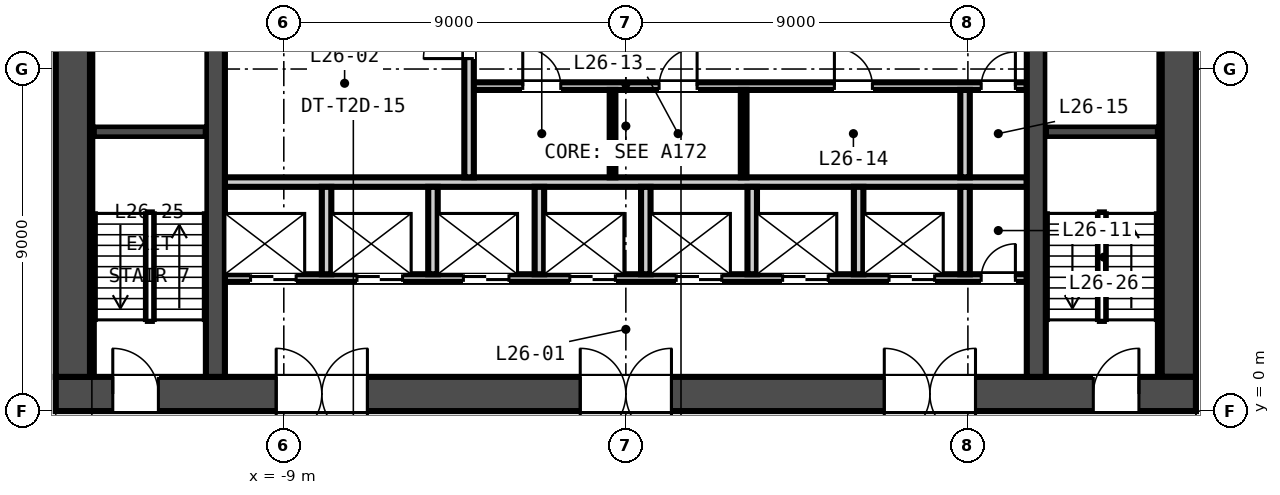
"""IFC4 building model, lengths in metres.
Left out: names, types, materials, properties, quantities, classifications, styles, units other than length and angle.
Written with IfcOpenShell. Run it as: python <this file> out.ifc"""

import sys

from ifc_helpers import new_model, si_unit, direction, frame, frame_2d, origin, place, context, subcontext, project, spatial, rectangle, extrude, element, fill, save


model = new_model("IFC4")
c1 = context("Model", 3, precision=1e-05, world=origin(), true_north=direction((0.0, 1.0)))
c2 = subcontext(c1, "Body", "Model", "MODEL_VIEW")
j1 = project(units=[si_unit("LENGTHUNIT", "METRE"), si_unit("PLANEANGLEUNIT", "RADIAN")], contexts=[c1])
p1 = place(None, origin())
s1 = spatial("IfcSite", under=j1, at=p1, CompositionType="ELEMENT")
p2 = place(p1, origin())
s2 = spatial("IfcBuilding", under=s1, at=p2, CompositionType="ELEMENT")
p3 = place(p2, frame((0.0, 0.0, 109.85)))
s3 = spatial("IfcBuildingStorey", under=s2, at=p3, CompositionType="ELEMENT", Elevation=109.85)
p4 = place(p3, frame((-15.0, 0.45, -0.15), z_axis=(0.0, 0.0, 1.0), x_axis=(1.0, 0.0, 0.0)))
e1 = element("IfcWall", 1, at=p4, inside=s3, PredefinedType="SOLIDWALL", context=c2, shape_type="SweptSolid", body=[
    extrude(rectangle(XDim=30.0, YDim=0.9, at=frame_2d((15.0, 0.0))), origin(), (0.0, 0.0, 1.0), 3.65),
])
p5 = place(p4, frame((5.8, 0.0, 0.15)))
e2 = element("IfcOpeningElement", 2, at=p5, cuts=e1, PredefinedType="OPENING", context=c2, shape_type="SweptSolid", body=[
    extrude(rectangle(XDim=2.4, YDim=2.4, at=frame_2d((1.2, 1.2))), frame((0.0, 0.46, 0.0), z_axis=(0.0, -1.0, 0.0), x_axis=(1.0, 0.0, 0.0)), (0.0, 0.0, 1.0), 0.92),
])
p6 = place(p4, frame((13.8, 0.0, 0.15)))
e3 = element("IfcOpeningElement", 3, at=p6, cuts=e1, PredefinedType="OPENING", context=c2, shape_type="SweptSolid", body=[
    extrude(rectangle(XDim=2.4, YDim=2.4, at=frame_2d((1.2, 1.2))), frame((0.0, 0.46, 0.0), z_axis=(0.0, -1.0, 0.0), x_axis=(1.0, 0.0, 0.0)), (0.0, 0.0, 1.0), 0.92),
])
p7 = place(p4, frame((21.8, 0.0, 0.15)))
e4 = element("IfcOpeningElement", 4, at=p7, cuts=e1, PredefinedType="OPENING", context=c2, shape_type="SweptSolid", body=[
    extrude(rectangle(XDim=2.4, YDim=2.4, at=frame_2d((1.2, 1.2))), frame((0.0, 0.46, 0.0), z_axis=(0.0, -1.0, 0.0), x_axis=(1.0, 0.0, 0.0)), (0.0, 0.0, 1.0), 0.92),
])
p8 = place(p4, frame((1.5, 0.0, 0.15)))
e5 = element("IfcOpeningElement", 5, at=p8, cuts=e1, PredefinedType="OPENING", context=c2, shape_type="SweptSolid", body=[
    extrude(rectangle(XDim=1.2, YDim=2.1, at=frame_2d((0.6, 1.05))), frame((0.0, 0.46, 0.0), z_axis=(0.0, -1.0, 0.0), x_axis=(1.0, 0.0, 0.0)), (0.0, 0.0, 1.0), 0.92),
])
p9 = place(p4, frame((27.3, 0.0, 0.15)))
e6 = element("IfcOpeningElement", 6, at=p9, cuts=e1, PredefinedType="OPENING", context=c2, shape_type="SweptSolid", body=[
    extrude(rectangle(XDim=1.2, YDim=2.1, at=frame_2d((0.6, 1.05))), frame((0.0, 0.46, 0.0), z_axis=(0.0, -1.0, 0.0), x_axis=(1.0, 0.0, 0.0)), (0.0, 0.0, 1.0), 0.92),
])
for number, where, z_axis, x_axis in (
    (7, (-14.55, 0.9, -0.15), (0.0, 0.0, 1.0), (0.0, 1.0, 0.0)),
    (8, (14.55, 0.9, -0.15), (0.0, 0.0, 1.0), (0.0, 1.0, 0.0)),
):
    element("IfcWall", number, at=place(p3, frame(where, z_axis=z_axis, x_axis=x_axis)), inside=s3, PredefinedType="SOLIDWALL", context=c2, shape_type="SweptSolid", body=[
        extrude(rectangle(XDim=13.2, YDim=0.9, at=frame_2d((6.6, 0.0))), origin(), (0.0, 0.0, 1.0), 3.65),
    ])
for number, where, z_axis, x_axis in (
    (9, (-10.8, 0.9, -0.15), (0.0, 0.0, 1.0), (0.0, 1.0, 0.0)),
    (10, (10.8, 0.9, -0.15), (0.0, 0.0, 1.0), (0.0, 1.0, 0.0)),
):
    element("IfcWall", number, at=place(p3, frame(where, z_axis=z_axis, x_axis=x_axis)), inside=s3, PredefinedType="SOLIDWALL", context=c2, shape_type="SweptSolid", body=[
        extrude(rectangle(XDim=13.2, YDim=0.5, at=frame_2d((6.6, 0.0))), origin(), (0.0, 0.0, 1.0), 3.65),
    ])
p10 = place(p3, frame((-10.55, 3.5, 0.0), z_axis=(0.0, 0.0, 1.0), x_axis=(1.0, 0.0, 0.0)))
e11 = element("IfcWall", 11, at=p10, inside=s3, PredefinedType="PARTITIONING", context=c2, shape_type="SweptSolid", body=[
    extrude(rectangle(XDim=21.1, YDim=0.2, at=frame_2d((10.55, 0.0))), origin(), (0.0, 0.0, 1.0), 3.5),
])
p11 = place(p10, frame((0.675, 0.0, 0.0)))
e12 = element("IfcOpeningElement", 12, at=p11, cuts=e11, PredefinedType="OPENING", context=c2, shape_type="SweptSolid", body=[
    extrude(rectangle(XDim=1.2, YDim=2.1, at=frame_2d((0.6, 1.05))), frame((0.0, 0.11, 0.0), z_axis=(0.0, -1.0, 0.0), x_axis=(1.0, 0.0, 0.0)), (0.0, 0.0, 1.0), 0.22),
])
p12 = place(p10, frame((3.475, 0.0, 0.0)))
e13 = element("IfcOpeningElement", 13, at=p12, cuts=e11, PredefinedType="OPENING", context=c2, shape_type="SweptSolid", body=[
    extrude(rectangle(XDim=1.2, YDim=2.1, at=frame_2d((0.6, 1.05))), frame((0.0, 0.11, 0.0), z_axis=(0.0, -1.0, 0.0), x_axis=(1.0, 0.0, 0.0)), (0.0, 0.0, 1.0), 0.22),
])
p13 = place(p10, frame((6.275, 0.0, 0.0)))
e14 = element("IfcOpeningElement", 14, at=p13, cuts=e11, PredefinedType="OPENING", context=c2, shape_type="SweptSolid", body=[
    extrude(rectangle(XDim=1.2, YDim=2.1, at=frame_2d((0.6, 1.05))), frame((0.0, 0.11, 0.0), z_axis=(0.0, -1.0, 0.0), x_axis=(1.0, 0.0, 0.0)), (0.0, 0.0, 1.0), 0.22),
])
p14 = place(p10, frame((9.075, 0.0, 0.0)))
e15 = element("IfcOpeningElement", 15, at=p14, cuts=e11, PredefinedType="OPENING", context=c2, shape_type="SweptSolid", body=[
    extrude(rectangle(XDim=1.2, YDim=2.1, at=frame_2d((0.6, 1.05))), frame((0.0, 0.11, 0.0), z_axis=(0.0, -1.0, 0.0), x_axis=(1.0, 0.0, 0.0)), (0.0, 0.0, 1.0), 0.22),
])
p15 = place(p10, frame((11.875, 0.0, 0.0)))
e16 = element("IfcOpeningElement", 16, at=p15, cuts=e11, PredefinedType="OPENING", context=c2, shape_type="SweptSolid", body=[
    extrude(rectangle(XDim=1.2, YDim=2.1, at=frame_2d((0.6, 1.05))), frame((0.0, 0.11, 0.0), z_axis=(0.0, -1.0, 0.0), x_axis=(1.0, 0.0, 0.0)), (0.0, 0.0, 1.0), 0.22),
])
p16 = place(p10, frame((14.675, 0.0, 0.0)))
e17 = element("IfcOpeningElement", 17, at=p16, cuts=e11, PredefinedType="OPENING", context=c2, shape_type="SweptSolid", body=[
    extrude(rectangle(XDim=1.2, YDim=2.1, at=frame_2d((0.6, 1.05))), frame((0.0, 0.11, 0.0), z_axis=(0.0, -1.0, 0.0), x_axis=(1.0, 0.0, 0.0)), (0.0, 0.0, 1.0), 0.22),
])
p17 = place(p10, frame((17.475, 0.0, 0.0)))
e18 = element("IfcOpeningElement", 18, at=p17, cuts=e11, PredefinedType="OPENING", context=c2, shape_type="SweptSolid", body=[
    extrude(rectangle(XDim=1.2, YDim=2.1, at=frame_2d((0.6, 1.05))), frame((0.0, 0.11, 0.0), z_axis=(0.0, -1.0, 0.0), x_axis=(1.0, 0.0, 0.0)), (0.0, 0.0, 1.0), 0.22),
])
p18 = place(p10, frame((19.9, 0.0, 0.0)))
e19 = element("IfcOpeningElement", 19, at=p18, cuts=e11, PredefinedType="OPENING", context=c2, shape_type="SweptSolid", body=[
    extrude(rectangle(XDim=0.9, YDim=2.1, at=frame_2d((0.45, 1.05))), frame((0.0, 0.11, 0.0), z_axis=(0.0, -1.0, 0.0), x_axis=(1.0, 0.0, 0.0)), (0.0, 0.0, 1.0), 0.22),
])
p19 = place(p3, frame((-10.55, 6.025, 0.0), z_axis=(0.0, 0.0, 1.0), x_axis=(1.0, 0.0, 0.0)))
e20 = element("IfcWall", 20, at=p19, inside=s3, PredefinedType="PARTITIONING", context=c2, shape_type="SweptSolid", body=[
    extrude(rectangle(XDim=21.1, YDim=0.25, at=frame_2d((10.55, 0.0))), origin(), (0.0, 0.0, 1.0), 3.5),
])
p20 = place(p3, frame((-4.125, 8.55, 0.0), z_axis=(0.0, 0.0, 1.0), x_axis=(1.0, 0.0, 0.0)))
e21 = element("IfcWall", 21, at=p20, inside=s3, PredefinedType="PARTITIONING", context=c2, shape_type="SweptSolid", body=[
    extrude(rectangle(XDim=14.675, YDim=0.2, at=frame_2d((7.337, 0.0))), origin(), (0.0, 0.0, 1.0), 3.5),
])
p21 = place(p20, frame((1.413, 0.0, 0.0)))
e22 = element("IfcOpeningElement", 22, at=p21, cuts=e21, PredefinedType="OPENING", context=c2, shape_type="SweptSolid", body=[
    extrude(rectangle(XDim=1.0, YDim=2.1, at=frame_2d((0.5, 1.05))), frame((0.0, 0.11, 0.0), z_axis=(0.0, -1.0, 0.0), x_axis=(1.0, 0.0, 0.0)), (0.0, 0.0, 1.0), 0.22),
])
p22 = place(p20, frame((5.0, 0.0, 0.0)))
e23 = element("IfcOpeningElement", 23, at=p22, cuts=e21, PredefinedType="OPENING", context=c2, shape_type="SweptSolid", body=[
    extrude(rectangle(XDim=1.0, YDim=2.1, at=frame_2d((0.5, 1.05))), frame((0.0, 0.11, 0.0), z_axis=(0.0, -1.0, 0.0), x_axis=(1.0, 0.0, 0.0)), (0.0, 0.0, 1.0), 0.22),
])
p23 = place(p20, frame((9.613, 0.0, 0.0)))
e24 = element("IfcOpeningElement", 24, at=p23, cuts=e21, PredefinedType="OPENING", context=c2, shape_type="SweptSolid", body=[
    extrude(rectangle(XDim=1.0, YDim=2.1, at=frame_2d((0.5, 1.05))), frame((0.0, 0.11, 0.0), z_axis=(0.0, -1.0, 0.0), x_axis=(1.0, 0.0, 0.0)), (0.0, 0.0, 1.0), 0.22),
])
p24 = place(p20, frame((13.475, 0.0, 0.0)))
e25 = element("IfcOpeningElement", 25, at=p24, cuts=e21, PredefinedType="OPENING", context=c2, shape_type="SweptSolid", body=[
    extrude(rectangle(XDim=0.9, YDim=2.1, at=frame_2d((0.45, 1.05))), frame((0.0, 0.11, 0.0), z_axis=(0.0, -1.0, 0.0), x_axis=(1.0, 0.0, 0.0)), (0.0, 0.0, 1.0), 0.22),
])
p25 = place(p3, frame((-4.125, 6.15, 0.0), z_axis=(0.0, 0.0, 1.0), x_axis=(0.0, 1.0, 0.0)))
e26 = element("IfcWall", 26, at=p25, inside=s3, PredefinedType="PARTITIONING", context=c2, shape_type="SweptSolid", body=[
    extrude(rectangle(XDim=4.95, YDim=0.25, at=frame_2d((2.475, 0.0))), origin(), (0.0, 0.0, 1.0), 3.5),
])
p26 = place(p25, frame((3.125, 0.0, 0.0)))
e27 = element("IfcOpeningElement", 27, at=p26, cuts=e26, PredefinedType="OPENING", context=c2, shape_type="SweptSolid", body=[
    extrude(rectangle(XDim=1.2, YDim=2.1, at=frame_2d((0.6, 1.05))), frame((0.0, 0.135, 0.0), z_axis=(0.0, -1.0, 0.0), x_axis=(1.0, 0.0, 0.0)), (0.0, 0.0, 1.0), 0.27),
])
for number, where, z_axis, x_axis in (
    (28, (-7.875, 3.6, 0.0), (0.0, 0.0, 1.0), (0.0, 1.0, 0.0)),
    (29, (-5.075, 3.6, 0.0), (0.0, 0.0, 1.0), (0.0, 1.0, 0.0)),
    (30, (-2.275, 3.6, 0.0), (0.0, 0.0, 1.0), (0.0, 1.0, 0.0)),
    (31, (0.525, 3.6, 0.0), (0.0, 0.0, 1.0), (0.0, 1.0, 0.0)),
    (32, (3.325, 3.6, 0.0), (0.0, 0.0, 1.0), (0.0, 1.0, 0.0)),
    (33, (6.125, 3.6, 0.0), (0.0, 0.0, 1.0), (0.0, 1.0, 0.0)),
    (34, (8.925, 3.6, 0.0), (0.0, 0.0, 1.0), (0.0, 1.0, 0.0)),
):
    element("IfcWall", number, at=place(p3, frame(where, z_axis=z_axis, x_axis=x_axis)), inside=s3, PredefinedType="PARTITIONING", context=c2, shape_type="SweptSolid", body=[
        extrude(rectangle(XDim=2.3, YDim=0.25, at=frame_2d((1.15, 0.0))), origin(), (0.0, 0.0, 1.0), 3.5),
    ])
for number, where, z_axis, x_axis in (
    (35, (-0.35, 6.15, 0.0), (0.0, 0.0, 1.0), (0.0, 1.0, 0.0)),
    (36, (3.1, 6.15, 0.0), (0.0, 0.0, 1.0), (0.0, 1.0, 0.0)),
):
    element("IfcWall", number, at=place(p3, frame(where, z_axis=z_axis, x_axis=x_axis)), inside=s3, PredefinedType="PARTITIONING", context=c2, shape_type="SweptSolid", body=[
        extrude(rectangle(XDim=2.3, YDim=0.15, at=frame_2d((1.15, 0.0))), origin(), (0.0, 0.0, 1.0), 3.5),
    ])
p27 = place(p3, frame((8.925, 6.15, 0.0), z_axis=(0.0, 0.0, 1.0), x_axis=(0.0, 1.0, 0.0)))
e37 = element("IfcWall", 37, at=p27, inside=s3, PredefinedType="PARTITIONING", context=c2, shape_type="SweptSolid", body=[
    extrude(rectangle(XDim=2.3, YDim=0.25, at=frame_2d((1.15, 0.0))), origin(), (0.0, 0.0, 1.0), 3.5),
])
p28 = place(p3, frame((-14.0, 7.35, 0.0), z_axis=(0.0, 0.0, 1.0), x_axis=(1.0, 0.0, 0.0)))
e38 = element("IfcWall", 38, at=p28, inside=s3, PredefinedType="SOLIDWALL", context=c2, shape_type="SweptSolid", body=[
    extrude(rectangle(XDim=2.95, YDim=0.3, at=frame_2d((1.475, 0.0))), origin(), (0.0, 0.0, 1.0), 3.5),
])
p29 = place(p3, frame((-14.05, 0.9, 0.0), z_axis=(0.0, 0.0, 1.0), x_axis=(0.0, 1.0, 0.0)))
e39 = element("IfcWall", 39, at=p29, inside=s3, PredefinedType="SOLIDWALL", context=c2, shape_type="SweptSolid", body=[
    extrude(rectangle(XDim=13.2, YDim=0.1, at=frame_2d((6.6, 0.0))), origin(), (0.0, 0.0, 1.0), 3.5),
])
p30 = place(p3, frame((11.05, 7.35, 0.0), z_axis=(0.0, 0.0, 1.0), x_axis=(1.0, 0.0, 0.0)))
e40 = element("IfcWall", 40, at=p30, inside=s3, PredefinedType="SOLIDWALL", context=c2, shape_type="SweptSolid", body=[
    extrude(rectangle(XDim=2.95, YDim=0.3, at=frame_2d((1.475, 0.0))), origin(), (0.0, 0.0, 1.0), 3.5),
])
p31 = place(p3, frame((14.05, 0.9, 0.0), z_axis=(0.0, 0.0, 1.0), x_axis=(0.0, 1.0, 0.0)))
e41 = element("IfcWall", 41, at=p31, inside=s3, PredefinedType="SOLIDWALL", context=c2, shape_type="SweptSolid", body=[
    extrude(rectangle(XDim=13.2, YDim=0.1, at=frame_2d((6.6, 0.0))), origin(), (0.0, 0.0, 1.0), 3.5),
])
p32 = place(p26, origin())
e42 = element("IfcDoor", 42, at=p32, inside=s3, OperationType="SINGLE_SWING_LEFT", PredefinedType="DOOR", context=c2, shape_type="SweptSolid", body=[
    extrude(rectangle(XDim=1.2, YDim=2.1, at=frame_2d((0.6, 1.05))), frame((0.0, 0.025, 0.0), z_axis=(0.0, -1.0, 0.0), x_axis=(1.0, 0.0, 0.0)), (0.0, 0.0, 1.0), 0.05),
])
fill(e27, e42)
p33 = place(p11, origin())
e43 = element("IfcDoor", 43, at=p33, inside=s3, OperationType="DOUBLE_DOOR_SLIDING", PredefinedType="DOOR", context=c2, shape_type="SweptSolid", body=[
    extrude(rectangle(XDim=1.2, YDim=2.1, at=frame_2d((0.6, 1.05))), frame((0.0, 0.025, 0.0), z_axis=(0.0, -1.0, 0.0), x_axis=(1.0, 0.0, 0.0)), (0.0, 0.0, 1.0), 0.05),
])
fill(e12, e43)
p34 = place(p12, origin())
e44 = element("IfcDoor", 44, at=p34, inside=s3, OperationType="DOUBLE_DOOR_SLIDING", PredefinedType="DOOR", context=c2, shape_type="SweptSolid", body=[
    extrude(rectangle(XDim=1.2, YDim=2.1, at=frame_2d((0.6, 1.05))), frame((0.0, 0.025, 0.0), z_axis=(0.0, -1.0, 0.0), x_axis=(1.0, 0.0, 0.0)), (0.0, 0.0, 1.0), 0.05),
])
fill(e13, e44)
p35 = place(p13, origin())
e45 = element("IfcDoor", 45, at=p35, inside=s3, OperationType="DOUBLE_DOOR_SLIDING", PredefinedType="DOOR", context=c2, shape_type="SweptSolid", body=[
    extrude(rectangle(XDim=1.2, YDim=2.1, at=frame_2d((0.6, 1.05))), frame((0.0, 0.025, 0.0), z_axis=(0.0, -1.0, 0.0), x_axis=(1.0, 0.0, 0.0)), (0.0, 0.0, 1.0), 0.05),
])
fill(e14, e45)
p36 = place(p14, origin())
e46 = element("IfcDoor", 46, at=p36, inside=s3, OperationType="DOUBLE_DOOR_SLIDING", PredefinedType="DOOR", context=c2, shape_type="SweptSolid", body=[
    extrude(rectangle(XDim=1.2, YDim=2.1, at=frame_2d((0.6, 1.05))), frame((0.0, 0.025, 0.0), z_axis=(0.0, -1.0, 0.0), x_axis=(1.0, 0.0, 0.0)), (0.0, 0.0, 1.0), 0.05),
])
fill(e15, e46)
p37 = place(p15, origin())
e47 = element("IfcDoor", 47, at=p37, inside=s3, OperationType="DOUBLE_DOOR_SLIDING", PredefinedType="DOOR", context=c2, shape_type="SweptSolid", body=[
    extrude(rectangle(XDim=1.2, YDim=2.1, at=frame_2d((0.6, 1.05))), frame((0.0, 0.025, 0.0), z_axis=(0.0, -1.0, 0.0), x_axis=(1.0, 0.0, 0.0)), (0.0, 0.0, 1.0), 0.05),
])
fill(e16, e47)
p38 = place(p16, origin())
e48 = element("IfcDoor", 48, at=p38, inside=s3, OperationType="DOUBLE_DOOR_SLIDING", PredefinedType="DOOR", context=c2, shape_type="SweptSolid", body=[
    extrude(rectangle(XDim=1.2, YDim=2.1, at=frame_2d((0.6, 1.05))), frame((0.0, 0.025, 0.0), z_axis=(0.0, -1.0, 0.0), x_axis=(1.0, 0.0, 0.0)), (0.0, 0.0, 1.0), 0.05),
])
fill(e17, e48)
p39 = place(p17, origin())
e49 = element("IfcDoor", 49, at=p39, inside=s3, OperationType="DOUBLE_DOOR_SLIDING", PredefinedType="DOOR", context=c2, shape_type="SweptSolid", body=[
    extrude(rectangle(XDim=1.2, YDim=2.1, at=frame_2d((0.6, 1.05))), frame((0.0, 0.025, 0.0), z_axis=(0.0, -1.0, 0.0), x_axis=(1.0, 0.0, 0.0)), (0.0, 0.0, 1.0), 0.05),
])
fill(e18, e49)
p40 = place(p18, origin())
e50 = element("IfcDoor", 50, at=p40, inside=s3, OperationType="SINGLE_SWING_RIGHT", PredefinedType="DOOR", context=c2, shape_type="SweptSolid", body=[
    extrude(rectangle(XDim=0.9, YDim=2.1, at=frame_2d((0.45, 1.05))), frame((0.0, 0.025, 0.0), z_axis=(0.0, -1.0, 0.0), x_axis=(1.0, 0.0, 0.0)), (0.0, 0.0, 1.0), 0.05),
])
fill(e19, e50)
p41 = place(p21, origin())
e51 = element("IfcDoor", 51, at=p41, inside=s3, OperationType="SINGLE_SWING_LEFT", PredefinedType="DOOR", context=c2, shape_type="SweptSolid", body=[
    extrude(rectangle(XDim=1.0, YDim=2.1, at=frame_2d((0.5, 1.05))), frame((0.0, 0.025, 0.0), z_axis=(0.0, -1.0, 0.0), x_axis=(1.0, 0.0, 0.0)), (0.0, 0.0, 1.0), 0.05),
])
fill(e22, e51)
p42 = place(p22, origin())
e52 = element("IfcDoor", 52, at=p42, inside=s3, OperationType="SINGLE_SWING_RIGHT", PredefinedType="DOOR", context=c2, shape_type="SweptSolid", body=[
    extrude(rectangle(XDim=1.0, YDim=2.1, at=frame_2d((0.5, 1.05))), frame((0.0, 0.025, 0.0), z_axis=(0.0, -1.0, 0.0), x_axis=(1.0, 0.0, 0.0)), (0.0, 0.0, 1.0), 0.05),
])
fill(e23, e52)
p43 = place(p23, origin())
e53 = element("IfcDoor", 53, at=p43, inside=s3, OperationType="SINGLE_SWING_LEFT", PredefinedType="DOOR", context=c2, shape_type="SweptSolid", body=[
    extrude(rectangle(XDim=1.0, YDim=2.1, at=frame_2d((0.5, 1.05))), frame((0.0, 0.025, 0.0), z_axis=(0.0, -1.0, 0.0), x_axis=(1.0, 0.0, 0.0)), (0.0, 0.0, 1.0), 0.05),
])
fill(e24, e53)
p44 = place(p24, origin())
e54 = element("IfcDoor", 54, at=p44, inside=s3, OperationType="SINGLE_SWING_RIGHT", PredefinedType="DOOR", context=c2, shape_type="SweptSolid", body=[
    extrude(rectangle(XDim=0.9, YDim=2.1, at=frame_2d((0.45, 1.05))), frame((0.0, 0.025, 0.0), z_axis=(0.0, -1.0, 0.0), x_axis=(1.0, 0.0, 0.0)), (0.0, 0.0, 1.0), 0.05),
])
fill(e25, e54)
p45 = place(p5, origin())
e55 = element("IfcDoor", 55, at=p45, inside=s3, OperationType="DOUBLE_DOOR_DOUBLE_SWING", PredefinedType="DOOR", context=c2, shape_type="SweptSolid", body=[
    extrude(rectangle(XDim=2.4, YDim=2.4, at=frame_2d((1.2, 1.2))), frame((0.0, 0.025, 0.0), z_axis=(0.0, -1.0, 0.0), x_axis=(1.0, 0.0, 0.0)), (0.0, 0.0, 1.0), 0.05),
])
fill(e2, e55)
p46 = place(p6, origin())
e56 = element("IfcDoor", 56, at=p46, inside=s3, OperationType="DOUBLE_DOOR_DOUBLE_SWING", PredefinedType="DOOR", context=c2, shape_type="SweptSolid", body=[
    extrude(rectangle(XDim=2.4, YDim=2.4, at=frame_2d((1.2, 1.2))), frame((0.0, 0.025, 0.0), z_axis=(0.0, -1.0, 0.0), x_axis=(1.0, 0.0, 0.0)), (0.0, 0.0, 1.0), 0.05),
])
fill(e3, e56)
p47 = place(p7, origin())
e57 = element("IfcDoor", 57, at=p47, inside=s3, OperationType="DOUBLE_DOOR_DOUBLE_SWING", PredefinedType="DOOR", context=c2, shape_type="SweptSolid", body=[
    extrude(rectangle(XDim=2.4, YDim=2.4, at=frame_2d((1.2, 1.2))), frame((0.0, 0.025, 0.0), z_axis=(0.0, -1.0, 0.0), x_axis=(1.0, 0.0, 0.0)), (0.0, 0.0, 1.0), 0.05),
])
fill(e4, e57)
p48 = place(p8, origin())
e58 = element("IfcDoor", 58, at=p48, inside=s3, OperationType="SINGLE_SWING_LEFT", PredefinedType="DOOR", context=c2, shape_type="SweptSolid", body=[
    extrude(rectangle(XDim=1.2, YDim=2.1, at=frame_2d((0.6, 1.05))), frame((0.0, 0.025, 0.0), z_axis=(0.0, -1.0, 0.0), x_axis=(1.0, 0.0, 0.0)), (0.0, 0.0, 1.0), 0.05),
])
fill(e5, e58)
p49 = place(p9, origin())
e59 = element("IfcDoor", 59, at=p49, inside=s3, OperationType="SINGLE_SWING_RIGHT", PredefinedType="DOOR", context=c2, shape_type="SweptSolid", body=[
    extrude(rectangle(XDim=1.2, YDim=2.1, at=frame_2d((0.6, 1.05))), frame((0.0, 0.025, 0.0), z_axis=(0.0, -1.0, 0.0), x_axis=(1.0, 0.0, 0.0)), (0.0, 0.0, 1.0), 0.05),
])
fill(e6, e59)
save(model, sys.argv[1])
